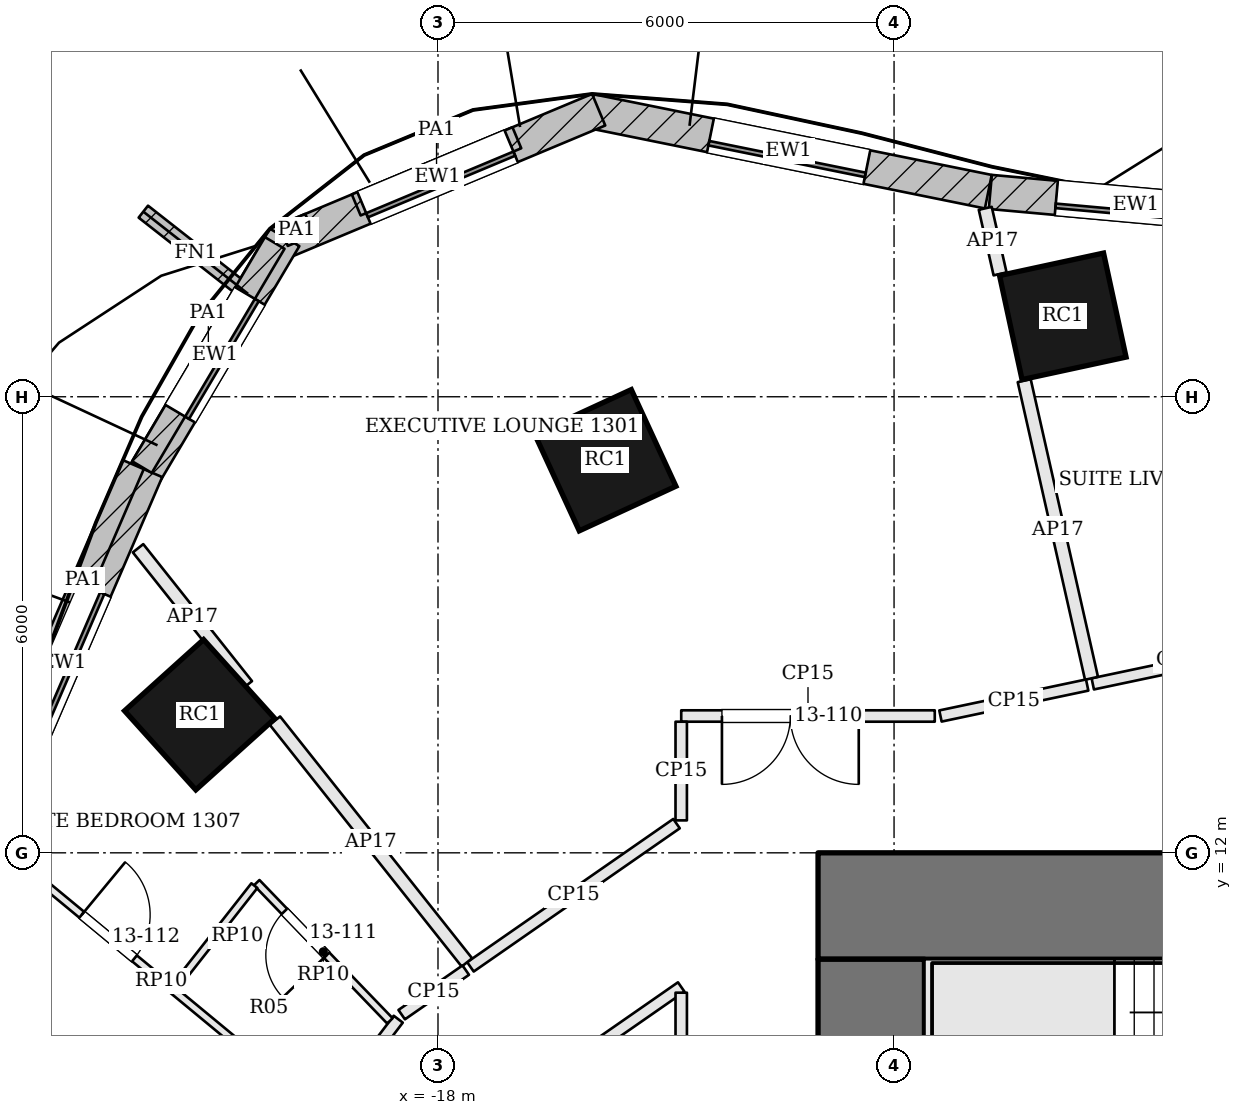
"""IFC4 building model, lengths in metres.
Left out: names, types, materials, properties, quantities, classifications, styles, units other than length and angle.
Written with IfcOpenShell. Run it as: python <this file> out.ifc"""

import sys

from ifc_helpers import new_model, si_unit, direction, frame, frame_2d, origin, origin_2d, place, context, subcontext, project, spatial, rectangle, extrude, element, fill, save


model = new_model("IFC4")
c1 = context("Model", 3, precision=1e-05, world=origin(), true_north=direction((0.0, 1.0)))
c2 = subcontext(c1, "Body", "Model", "MODEL_VIEW")
j1 = project(units=[si_unit("LENGTHUNIT", "METRE"), si_unit("PLANEANGLEUNIT", "RADIAN")], contexts=[c1])
p1 = place(None, origin())
s1 = spatial("IfcSite", under=j1, at=p1, CompositionType="ELEMENT")
p2 = place(p1, origin())
s2 = spatial("IfcBuilding", under=s1, at=p2, CompositionType="ELEMENT")
p3 = place(p2, frame((0.0, 0.0, 62.7)))
s3 = spatial("IfcBuildingStorey", under=s2, at=p3, CompositionType="ELEMENT", Elevation=62.7)
p4 = place(p3, frame((-13.0, 11.3, 0.0), z_axis=(0.0, 0.0, 1.0), x_axis=(1.0, 0.0, 0.0)))
e1 = element("IfcWall", 1, at=p4, inside=s3, PredefinedType="SHEAR", context=c2, shape_type="SweptSolid", body=[
    extrude(rectangle(XDim=26.0, YDim=1.4, at=frame_2d((13.0, 0.0))), origin(), (0.0, 0.0, 1.0), 3.6),
])
p5 = place(p4, frame((9.225, 0.0, 0.0)))
e2 = element("IfcOpeningElement", 2, at=p5, cuts=e1, PredefinedType="OPENING", context=c2, shape_type="SweptSolid", body=[
    extrude(rectangle(XDim=1.0, YDim=2.1, at=frame_2d((0.5, 1.05))), frame((0.0, 0.71, 0.0), z_axis=(0.0, -1.0, 0.0), x_axis=(1.0, 0.0, 0.0)), (0.0, 0.0, 1.0), 1.42),
])
p6 = place(p4, frame((12.225, 0.0, 0.0)))
e3 = element("IfcOpeningElement", 3, at=p6, cuts=e1, PredefinedType="OPENING", context=c2, shape_type="SweptSolid", body=[
    extrude(rectangle(XDim=0.7, YDim=2.1, at=frame_2d((0.35, 1.05))), frame((0.0, 0.71, 0.0), z_axis=(0.0, -1.0, 0.0), x_axis=(1.0, 0.0, 0.0)), (0.0, 0.0, 1.0), 1.42),
])
p7 = place(p4, frame((14.125, 0.0, 0.0)))
e4 = element("IfcOpeningElement", 4, at=p7, cuts=e1, PredefinedType="OPENING", context=c2, shape_type="SweptSolid", body=[
    extrude(rectangle(XDim=1.0, YDim=2.1, at=frame_2d((0.5, 1.05))), frame((0.0, 0.71, 0.0), z_axis=(0.0, -1.0, 0.0), x_axis=(1.0, 0.0, 0.0)), (0.0, 0.0, 1.0), 1.42),
])
p8 = place(p4, frame((15.65, 0.0, 0.0)))
e5 = element("IfcOpeningElement", 5, at=p8, cuts=e1, PredefinedType="OPENING", context=c2, shape_type="SweptSolid", body=[
    extrude(rectangle(XDim=1.0, YDim=2.1, at=frame_2d((0.5, 1.05))), frame((0.0, 0.71, 0.0), z_axis=(0.0, -1.0, 0.0), x_axis=(1.0, 0.0, 0.0)), (0.0, 0.0, 1.0), 1.42),
])
p9 = place(p3, frame((-12.3, -1.6, 0.0), z_axis=(0.0, 0.0, 1.0), x_axis=(0.0, 1.0, 0.0)))
e6 = element("IfcWall", 6, at=p9, inside=s3, PredefinedType="SHEAR", context=c2, shape_type="SweptSolid", body=[
    extrude(rectangle(XDim=12.2, YDim=1.4, at=frame_2d((6.1, 0.0))), origin(), (0.0, 0.0, 1.0), 3.6),
])
p10 = place(p9, frame((3.6, 0.0, 0.0)))
e7 = element("IfcOpeningElement", 7, at=p10, cuts=e6, PredefinedType="OPENING", context=c2, shape_type="SweptSolid", body=[
    extrude(rectangle(XDim=1.8, YDim=2.1, at=frame_2d((0.9, 1.05))), frame((0.0, 0.71, 0.0), z_axis=(0.0, -1.0, 0.0), x_axis=(1.0, 0.0, 0.0)), (0.0, 0.0, 1.0), 1.42),
])
for number, where, z_axis, x_axis in (
    (8, (-9.78, 19.058, 0.0), (0.0, 0.0, 1.0), (-0.977, -0.211, 0.0)),
    (9, (-15.799, 17.165, 0.0), (0.0, 0.0, 1.0), (-0.908, -0.419, 0.0)),
    (10, (-21.135, 13.817, 0.0), (0.0, 0.0, 1.0), (-0.743, -0.67, 0.0)),
):
    element("IfcColumn", number, at=place(p3, frame(where, z_axis=z_axis, x_axis=x_axis)), inside=s3, PredefinedType="COLUMN", context=c2, shape_type="SweptSolid", body=[
        extrude(rectangle(XDim=1.4, YDim=1.4, at=origin_2d()), origin(), (0.0, 0.0, 1.0), 3.6),
    ])
p11 = place(p3, frame((-6.906, 20.349, 0.0), z_axis=(0.0, 0.0, 1.0), x_axis=(-0.995947174038, 0.089940127451, 0.0)))
e11 = element("IfcWall", 11, at=p11, inside=s3, PredefinedType="SOLIDWALL", context=c2, shape_type="SweptSolid", body=[
    extrude(rectangle(XDim=3.844, YDim=0.45, at=frame_2d((1.922, 0.0))), origin(), (0.0, 0.0, 1.0), 3.4),
])
p12 = place(p11, frame((0.872, 0.0, 0.9)))
e12 = element("IfcOpeningElement", 12, at=p12, cuts=e11, PredefinedType="OPENING", context=c2, shape_type="SweptSolid", body=[
    extrude(rectangle(XDim=2.1, YDim=2.0, at=frame_2d((1.05, 1.0))), frame((0.0, 0.235, 0.0), z_axis=(0.0, -1.0, 0.0), x_axis=(1.0, 0.0, 0.0)), (0.0, 0.0, 1.0), 0.47),
])
p13 = place(p3, frame((-10.76, 20.698, 0.0), z_axis=(0.0, 0.0, 1.0), x_axis=(-0.980072890434, 0.198638187256, 0.0)))
e13 = element("IfcWall", 13, at=p13, inside=s3, PredefinedType="SOLIDWALL", context=c2, shape_type="SweptSolid", body=[
    extrude(rectangle(XDim=5.36, YDim=0.45, at=frame_2d((2.68, 0.0))), origin(), (0.0, 0.0, 1.0), 3.4),
])
p14 = place(p13, frame((1.63, 0.0, 0.9)))
e14 = element("IfcOpeningElement", 14, at=p14, cuts=e13, PredefinedType="OPENING", context=c2, shape_type="SweptSolid", body=[
    extrude(rectangle(XDim=2.1, YDim=2.0, at=frame_2d((1.05, 1.0))), frame((0.0, 0.235, 0.0), z_axis=(0.0, -1.0, 0.0), x_axis=(1.0, 0.0, 0.0)), (0.0, 0.0, 1.0), 0.47),
])
p15 = place(p3, frame((-15.886, 21.776, 0.0), z_axis=(0.0, 0.0, 1.0), x_axis=(-0.922527247898, -0.385931958882, 0.0)))
e15 = element("IfcWall", 15, at=p15, inside=s3, PredefinedType="SOLIDWALL", context=c2, shape_type="SweptSolid", body=[
    extrude(rectangle(XDim=4.594, YDim=0.45, at=frame_2d((2.297, 0.0))), origin(), (0.0, 0.0, 1.0), 3.4),
])
p16 = place(p15, frame((1.247, 0.0, 0.9)))
e16 = element("IfcOpeningElement", 16, at=p16, cuts=e15, PredefinedType="OPENING", context=c2, shape_type="SweptSolid", body=[
    extrude(rectangle(XDim=2.1, YDim=2.0, at=frame_2d((1.05, 1.0))), frame((0.0, 0.235, 0.0), z_axis=(0.0, -1.0, 0.0), x_axis=(1.0, 0.0, 0.0)), (0.0, 0.0, 1.0), 0.47),
])
p17 = place(p3, frame((-20.017, 20.096, 0.0), z_axis=(0.0, 0.0, 1.0), x_axis=(-0.509718522454, -0.860341227576, 0.0)))
e17 = element("IfcWall", 17, at=p17, inside=s3, PredefinedType="SOLIDWALL", context=c2, shape_type="SweptSolid", body=[
    extrude(rectangle(XDim=3.591, YDim=0.45, at=frame_2d((1.795, 0.0))), origin(), (0.0, 0.0, 1.0), 3.4),
])
p18 = place(p17, frame((0.896, 0.0, 0.9)))
e18 = element("IfcOpeningElement", 18, at=p18, cuts=e17, PredefinedType="OPENING", context=c2, shape_type="SweptSolid", body=[
    extrude(rectangle(XDim=1.8, YDim=2.0, at=frame_2d((0.9, 1.0))), frame((0.0, 0.235, 0.0), z_axis=(0.0, -1.0, 0.0), x_axis=(1.0, 0.0, 0.0)), (0.0, 0.0, 1.0), 0.47),
])
p19 = place(p3, frame((-21.835, 17.032, 0.0), z_axis=(0.0, 0.0, 1.0), x_axis=(-0.396103523022, -0.918205858753, 0.0)))
e19 = element("IfcWall", 19, at=p19, inside=s3, PredefinedType="SOLIDWALL", context=c2, shape_type="SweptSolid", body=[
    extrude(rectangle(XDim=5.528, YDim=0.45, at=frame_2d((2.764, 0.0))), origin(), (0.0, 0.0, 1.0), 3.4),
])
p20 = place(p19, frame((1.714, 0.0, 0.9)))
e20 = element("IfcOpeningElement", 20, at=p20, cuts=e19, PredefinedType="OPENING", context=c2, shape_type="SweptSolid", body=[
    extrude(rectangle(XDim=2.1, YDim=2.0, at=frame_2d((1.05, 1.0))), frame((0.0, 0.235, 0.0), z_axis=(0.0, -1.0, 0.0), x_axis=(1.0, 0.0, 0.0)), (0.0, 0.0, 1.0), 0.47),
])
p21 = place(p3, frame((-20.5, 19.355, 0.0), z_axis=(0.0, 0.0, 1.0), x_axis=(-0.786700632228, 0.617334686577, 0.0)))
e21 = element("IfcWall", 21, at=p21, inside=s3, PredefinedType="SOLIDWALL", context=c2, shape_type="SweptSolid", body=[
    extrude(rectangle(XDim=1.75, YDim=0.2, at=frame_2d((0.875, 0.0))), origin(), (0.0, 0.0, 1.0), 3.4),
])
p22 = place(p3, frame((-16.962, 21.407, 3.6), z_axis=(0.0, 0.0, 1.0), x_axis=(-0.922533659014, -0.385916633467, 0.0)))
e22 = element("IfcWall", 22, at=p22, inside=s3, PredefinedType="PARAPET", context=c2, shape_type="SweptSolid", body=[
    extrude(rectangle(XDim=2.291, YDim=0.3, at=frame_2d((1.146, 0.0))), origin(), (0.0, 0.0, 1.0), 1.1),
])
p23 = place(p3, frame((-19.688, 20.267, 3.6), z_axis=(0.0, 0.0, 1.0), x_axis=(-0.922419372029, -0.386189722943, 0.0)))
e23 = element("IfcWall", 23, at=p23, inside=s3, PredefinedType="PARAPET", context=c2, shape_type="SweptSolid", body=[
    extrude(rectangle(XDim=0.374, YDim=0.3, at=frame_2d((0.187, 0.0))), origin(), (0.0, 0.0, 1.0), 1.1),
])
p24 = place(p3, frame((-20.148, 20.023, 3.6), z_axis=(0.0, 0.0, 1.0), x_axis=(-0.509657876052, -0.860377155309, 0.0)))
e24 = element("IfcWall", 24, at=p24, inside=s3, PredefinedType="PARAPET", context=c2, shape_type="SweptSolid", body=[
    extrude(rectangle(XDim=3.427, YDim=0.3, at=frame_2d((1.713, 0.0))), origin(), (0.0, 0.0, 1.0), 1.1),
])
p25 = place(p3, frame((-22.009, 17.107, 3.6), z_axis=(0.0, 0.0, 1.0), x_axis=(-0.396142292889, -0.918189132905, 0.0)))
e25 = element("IfcWall", 25, at=p25, inside=s3, PredefinedType="PARAPET", context=c2, shape_type="SweptSolid", body=[
    extrude(rectangle(XDim=3.312, YDim=0.3, at=frame_2d((1.656, 0.0))), origin(), (0.0, 0.0, 1.0), 1.1),
])
p26 = place(p3, frame((-6.43, 14.846, 0.0), z_axis=(0.0, 0.0, 1.0), x_axis=(-0.978469112666, -0.206393303085, 0.0)))
e26 = element("IfcWall", 26, at=p26, inside=s3, PredefinedType="PARTITIONING", context=c2, shape_type="SweptSolid", body=[
    extrude(rectangle(XDim=3.021, YDim=0.15, at=frame_2d((1.51, 0.0))), origin(), (0.0, 0.0, 1.0), 2.68),
])
p27 = place(p26, frame((0.797, 0.0, 0.0)))
e27 = element("IfcOpeningElement", 27, at=p27, cuts=e26, PredefinedType="OPENING", context=c2, shape_type="SweptSolid", body=[
    extrude(rectangle(XDim=1.0, YDim=2.1, at=frame_2d((0.5, 1.05))), frame((0.0, 0.085, 0.0), z_axis=(0.0, -1.0, 0.0), x_axis=(1.0, 0.0, 0.0)), (0.0, 0.0, 1.0), 0.17),
])
p28 = place(p3, frame((-10.8, 20.479, 0.0), z_axis=(0.0, 0.0, 1.0), x_axis=(0.220786026072, -0.975322270171, 0.0)))
e28 = element("IfcWall", 28, at=p28, inside=s3, PredefinedType="PARTITIONING", context=c2, shape_type="SweptSolid", body=[
    extrude(rectangle(XDim=0.885, YDim=0.175, at=frame_2d((0.442, 0.0))), origin(), (0.0, 0.0, 1.0), 2.68),
])
p29 = place(p3, frame((-10.288, 18.211, 0.0), z_axis=(0.0, 0.0, 1.0), x_axis=(0.220522195693, -0.975381956572, 0.0)))
e29 = element("IfcWall", 29, at=p29, inside=s3, PredefinedType="PARTITIONING", context=c2, shape_type="SweptSolid", body=[
    extrude(rectangle(XDim=4.014, YDim=0.175, at=frame_2d((2.007, 0.0))), origin(), (0.0, 0.0, 1.0), 2.68),
])
p30 = place(p3, frame((-9.459, 14.207, 0.0), z_axis=(0.0, 0.0, 1.0), x_axis=(-0.978460400771, -0.206434600112, 0.0)))
e30 = element("IfcWall", 30, at=p30, inside=s3, PredefinedType="PARTITIONING", context=c2, shape_type="SweptSolid", body=[
    extrude(rectangle(XDim=1.973, YDim=0.15, at=frame_2d((0.986, 0.0))), origin(), (0.0, 0.0, 1.0), 2.68),
])
p31 = place(p3, frame((-11.464, 13.8, 0.0), z_axis=(0.0, 0.0, 1.0), x_axis=(-1.0, 0.0, 0.0)))
e31 = element("IfcWall", 31, at=p31, inside=s3, PredefinedType="PARTITIONING", context=c2, shape_type="SweptSolid", body=[
    extrude(rectangle(XDim=3.336, YDim=0.15, at=frame_2d((1.668, 0.0))), origin(), (0.0, 0.0, 1.0), 2.68),
])
p32 = place(p31, frame((1.0, 0.0, 0.0)))
e32 = element("IfcOpeningElement", 32, at=p32, cuts=e31, PredefinedType="OPENING", context=c2, shape_type="SweptSolid", body=[
    extrude(rectangle(XDim=1.8, YDim=2.1, at=frame_2d((0.9, 1.05))), frame((0.0, 0.085, 0.0), z_axis=(0.0, -1.0, 0.0), x_axis=(1.0, 0.0, 0.0)), (0.0, 0.0, 1.0), 0.17),
])
p33 = place(p3, frame((-14.8, 13.725, 0.0), z_axis=(0.0, 0.0, 1.0), x_axis=(-0.000188040613, -0.99999998232, 0.0)))
e33 = element("IfcWall", 33, at=p33, inside=s3, PredefinedType="PARTITIONING", context=c2, shape_type="SweptSolid", body=[
    extrude(rectangle(XDim=1.298, YDim=0.15, at=frame_2d((0.649, 0.0))), origin(), (0.0, 0.0, 1.0), 2.68),
])
p34 = place(p3, frame((-14.862, 12.384, 0.0), z_axis=(0.0, 0.0, 1.0), x_axis=(-0.821144742038, -0.570719994939, 0.0)))
e34 = element("IfcWall", 34, at=p34, inside=s3, PredefinedType="PARTITIONING", context=c2, shape_type="SweptSolid", body=[
    extrude(rectangle(XDim=3.302, YDim=0.15, at=frame_2d((1.651, 0.0))), origin(), (0.0, 0.0, 1.0), 2.68),
])
p35 = place(p3, frame((-21.946, 16.007, 0.0), z_axis=(0.0, 0.0, 1.0), x_axis=(0.621870662711, -0.783119964539, 0.0)))
e35 = element("IfcWall", 35, at=p35, inside=s3, PredefinedType="PARTITIONING", context=c2, shape_type="SweptSolid", body=[
    extrude(rectangle(XDim=2.301, YDim=0.175, at=frame_2d((1.151, 0.0))), origin(), (0.0, 0.0, 1.0), 2.68),
])
p36 = place(p3, frame((-20.146, 13.74, 0.0), z_axis=(0.0, 0.0, 1.0), x_axis=(0.621832273855, -0.783150447355, 0.0)))
e36 = element("IfcWall", 36, at=p36, inside=s3, PredefinedType="PARTITIONING", context=c2, shape_type="SweptSolid", body=[
    extrude(rectangle(XDim=4.062, YDim=0.175, at=frame_2d((2.031, 0.0))), origin(), (0.0, 0.0, 1.0), 2.68),
])
p37 = place(p3, frame((-17.635, 10.457, 0.0), z_axis=(0.0, 0.0, 1.0), x_axis=(-0.821171783561, -0.570681085969, 0.0)))
e37 = element("IfcWall", 37, at=p37, inside=s3, PredefinedType="PARTITIONING", context=c2, shape_type="SweptSolid", body=[
    extrude(rectangle(XDim=1.026, YDim=0.15, at=frame_2d((0.513, 0.0))), origin(), (0.0, 0.0, 1.0), 2.68),
])
p38 = place(p3, frame((-18.523, 9.811, 0.0), z_axis=(0.0, 0.0, 1.0), x_axis=(-0.605040130963, -0.796194976073, 0.0)))
e38 = element("IfcWall", 38, at=p38, inside=s3, PredefinedType="PARTITIONING", context=c2, shape_type="SweptSolid", body=[
    extrude(rectangle(XDim=3.588, YDim=0.15, at=frame_2d((1.794, 0.0))), origin(), (0.0, 0.0, 1.0), 2.68),
])
p39 = place(p3, frame((-17.155, 8.598, 0.0), z_axis=(0.0, 0.0, 1.0), x_axis=(0.821087350938, 0.570802559673, 0.0)))
e39 = element("IfcWall", 39, at=p39, inside=s3, PredefinedType="PARTITIONING", context=c2, shape_type="SweptSolid", body=[
    extrude(rectangle(XDim=2.868, YDim=0.15, at=frame_2d((1.434, 0.0))), origin(), (0.0, 0.0, 1.0), 2.68),
])
p40 = place(p3, frame((-14.8, 10.16, 0.0), z_axis=(0.0, 0.0, 1.0), x_axis=(0.0, -1.0, 0.0)))
e40 = element("IfcWall", 40, at=p40, inside=s3, PredefinedType="PARTITIONING", context=c2, shape_type="SweptSolid", body=[
    extrude(rectangle(XDim=14.96, YDim=0.15, at=frame_2d((7.48, 0.0))), origin(), (0.0, 0.0, 1.0), 2.68),
])
p41 = place(p40, frame((4.543, 0.0, 0.0)))
e41 = element("IfcOpeningElement", 41, at=p41, cuts=e40, PredefinedType="OPENING", context=c2, shape_type="SweptSolid", body=[
    extrude(rectangle(XDim=1.0, YDim=2.1, at=frame_2d((0.5, 1.05))), frame((0.0, 0.085, 0.0), z_axis=(0.0, -1.0, 0.0), x_axis=(1.0, 0.0, 0.0)), (0.0, 0.0, 1.0), 0.17),
])
p42 = place(p3, frame((-23.734, 12.051, 0.0), z_axis=(0.0, 0.0, 1.0), x_axis=(0.770730551599, -0.6371612173, 0.0)))
e42 = element("IfcWall", 42, at=p42, inside=s3, PredefinedType="PARTITIONING", context=c2, shape_type="SweptSolid", body=[
    extrude(rectangle(XDim=5.434, YDim=0.1, at=frame_2d((2.717, 0.0))), origin(), (0.0, 0.0, 1.0), 2.68),
])
p43 = place(p42, frame((1.359, 0.0, 0.0)))
e43 = element("IfcOpeningElement", 43, at=p43, cuts=e42, PredefinedType="OPENING", context=c2, shape_type="SweptSolid", body=[
    extrude(rectangle(XDim=0.9, YDim=2.4, at=frame_2d((0.45, 1.2))), frame((0.0, 0.06, 0.0), z_axis=(0.0, -1.0, 0.0), x_axis=(1.0, 0.0, 0.0)), (0.0, 0.0, 1.0), 0.12),
])
p44 = place(p3, frame((-18.633, 9.789, 0.0), z_axis=(0.0, 0.0, 1.0), x_axis=(-0.693885037795, 0.720085796502, 0.0)))
e44 = element("IfcWall", 44, at=p44, inside=s3, PredefinedType="PARTITIONING", context=c2, shape_type="SweptSolid", body=[
    extrude(rectangle(XDim=2.525, YDim=0.1, at=frame_2d((1.263, 0.0))), origin(), (0.0, 0.0, 1.0), 2.68),
])
p45 = place(p44, frame((1.2, 0.0, 0.0)))
e45 = element("IfcOpeningElement", 45, at=p45, cuts=e44, PredefinedType="OPENING", context=c2, shape_type="SweptSolid", body=[
    extrude(rectangle(XDim=0.8, YDim=2.1, at=frame_2d((0.4, 1.05))), frame((0.0, 0.06, 0.0), z_axis=(0.0, -1.0, 0.0), x_axis=(1.0, 0.0, 0.0)), (0.0, 0.0, 1.0), 0.12),
])
p46 = place(p3, frame((-20.416, 11.568, 0.0), z_axis=(0.0, 0.0, 1.0), x_axis=(-0.617598582762, -0.786493477767, 0.0)))
e46 = element("IfcWall", 46, at=p46, inside=s3, PredefinedType="PARTITIONING", context=c2, shape_type="SweptSolid", body=[
    extrude(rectangle(XDim=1.693, YDim=0.1, at=frame_2d((0.846, 0.0))), origin(), (0.0, 0.0, 1.0), 2.68),
])
p47 = place(p12, origin())
e47 = element("IfcWindow", 47, at=p47, inside=s3, PartitioningType="SINGLE_PANEL", PredefinedType="WINDOW", context=c2, shape_type="SweptSolid", body=[
    extrude(rectangle(XDim=2.1, YDim=2.0, at=frame_2d((1.05, 1.0))), frame((0.0, 0.135, 0.0), z_axis=(0.0, -1.0, 0.0), x_axis=(1.0, 0.0, 0.0)), (0.0, 0.0, 1.0), 0.06),
])
fill(e12, e47)
p48 = place(p14, origin())
e48 = element("IfcWindow", 48, at=p48, inside=s3, PartitioningType="SINGLE_PANEL", PredefinedType="WINDOW", context=c2, shape_type="SweptSolid", body=[
    extrude(rectangle(XDim=2.1, YDim=2.0, at=frame_2d((1.05, 1.0))), frame((0.0, 0.135, 0.0), z_axis=(0.0, -1.0, 0.0), x_axis=(1.0, 0.0, 0.0)), (0.0, 0.0, 1.0), 0.06),
])
fill(e14, e48)
p49 = place(p16, origin())
e49 = element("IfcWindow", 49, at=p49, inside=s3, PartitioningType="SINGLE_PANEL", PredefinedType="WINDOW", context=c2, shape_type="SweptSolid", body=[
    extrude(rectangle(XDim=2.1, YDim=2.0, at=frame_2d((1.05, 1.0))), frame((0.0, 0.135, 0.0), z_axis=(0.0, -1.0, 0.0), x_axis=(1.0, 0.0, 0.0)), (0.0, 0.0, 1.0), 0.06),
])
fill(e16, e49)
p50 = place(p18, origin())
e50 = element("IfcWindow", 50, at=p50, inside=s3, PartitioningType="SINGLE_PANEL", PredefinedType="WINDOW", context=c2, shape_type="SweptSolid", body=[
    extrude(rectangle(XDim=1.8, YDim=2.0, at=frame_2d((0.9, 1.0))), frame((0.0, 0.135, 0.0), z_axis=(0.0, -1.0, 0.0), x_axis=(1.0, 0.0, 0.0)), (0.0, 0.0, 1.0), 0.06),
])
fill(e18, e50)
p51 = place(p20, origin())
e51 = element("IfcWindow", 51, at=p51, inside=s3, PartitioningType="SINGLE_PANEL", PredefinedType="WINDOW", context=c2, shape_type="SweptSolid", body=[
    extrude(rectangle(XDim=2.1, YDim=2.0, at=frame_2d((1.05, 1.0))), frame((0.0, 0.135, 0.0), z_axis=(0.0, -1.0, 0.0), x_axis=(1.0, 0.0, 0.0)), (0.0, 0.0, 1.0), 0.06),
])
fill(e20, e51)
p52 = place(p32, origin())
e52 = element("IfcDoor", 52, at=p52, inside=s3, OperationType="DOUBLE_DOOR_SINGLE_SWING", PredefinedType="DOOR", context=c2, shape_type="SweptSolid", body=[
    extrude(rectangle(XDim=1.8, YDim=2.1, at=frame_2d((0.9, 1.05))), frame((0.0, 0.025, 0.0), z_axis=(0.0, -1.0, 0.0), x_axis=(1.0, 0.0, 0.0)), (0.0, 0.0, 1.0), 0.05),
])
fill(e32, e52)
p53 = place(p45, origin())
e53 = element("IfcDoor", 53, at=p53, inside=s3, OperationType="SINGLE_SWING_LEFT", PredefinedType="DOOR", context=c2, shape_type="SweptSolid", body=[
    extrude(rectangle(XDim=0.8, YDim=2.1, at=frame_2d((0.4, 1.05))), frame((0.0, 0.025, 0.0), z_axis=(0.0, -1.0, 0.0), x_axis=(1.0, 0.0, 0.0)), (0.0, 0.0, 1.0), 0.05),
])
fill(e45, e53)
p54 = place(p43, origin())
e54 = element("IfcDoor", 54, at=p54, inside=s3, OperationType="SINGLE_SWING_LEFT", PredefinedType="DOOR", context=c2, shape_type="SweptSolid", body=[
    extrude(rectangle(XDim=0.9, YDim=2.4, at=frame_2d((0.45, 1.2))), frame((0.0, 0.025, 0.0), z_axis=(0.0, -1.0, 0.0), x_axis=(1.0, 0.0, 0.0)), (0.0, 0.0, 1.0), 0.05),
])
fill(e43, e54)
save(model, sys.argv[1])
